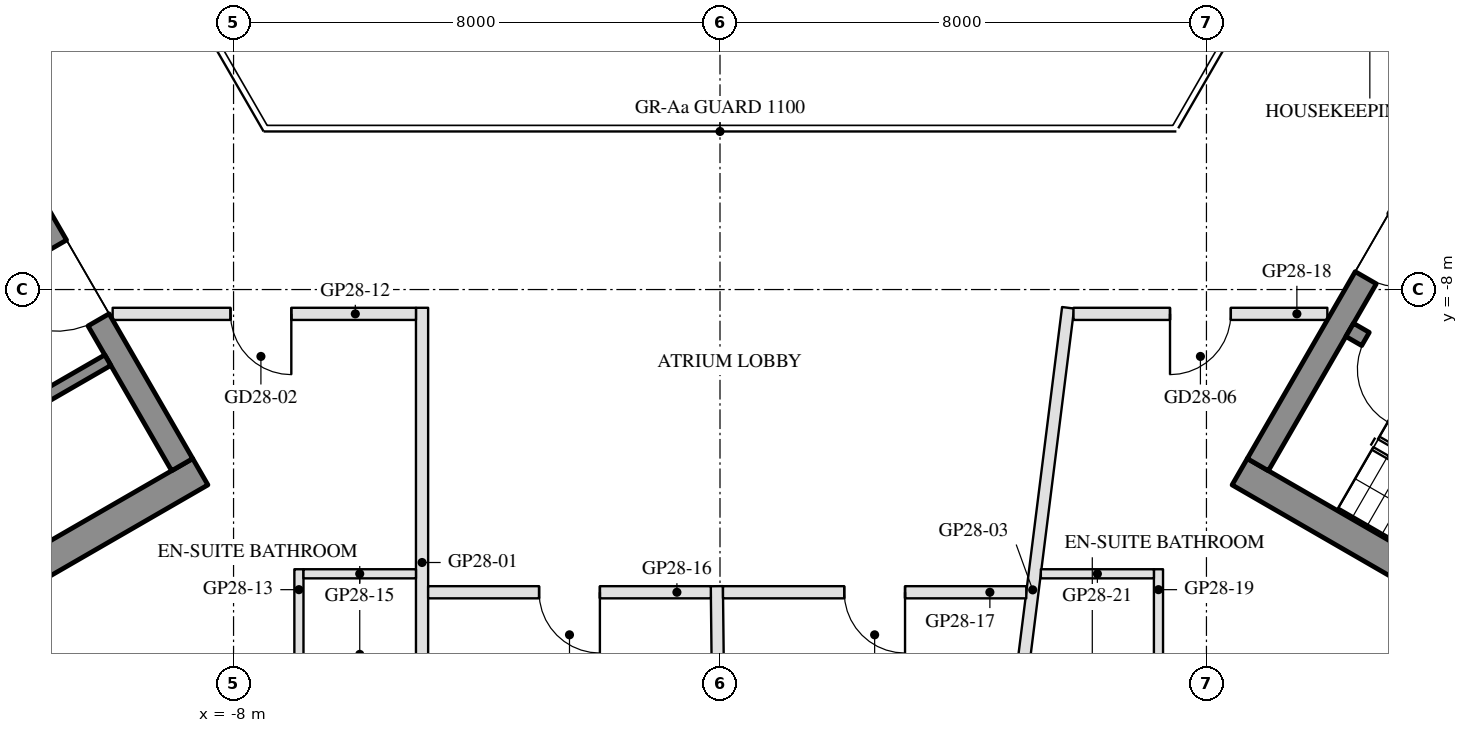
"""IFC4 building model, lengths in metres.
Left out: names, types, materials, properties, quantities, classifications, styles, units other than length and angle.
Written with IfcOpenShell. Run it as: python <this file> out.ifc"""

import sys

from ifc_helpers import new_model, si_unit, direction, frame, frame_2d, origin, place, context, subcontext, project, spatial, rectangle, extrude, element, fill, save


model = new_model("IFC4")
c1 = context("Model", 3, precision=1e-05, world=origin(), true_north=direction((0.0, 1.0)))
c2 = subcontext(c1, "Body", "Model", "MODEL_VIEW")
j1 = project(units=[si_unit("LENGTHUNIT", "METRE"), si_unit("PLANEANGLEUNIT", "RADIAN")], contexts=[c1])
p1 = place(None, origin())
s1 = spatial("IfcSite", under=j1, at=p1, CompositionType="ELEMENT")
p2 = place(p1, origin())
s2 = spatial("IfcBuilding", under=s1, at=p2, CompositionType="ELEMENT")
p3 = place(p2, frame((0.0, 0.0, 283.7)))
s3 = spatial("IfcBuildingStorey", under=s2, at=p3, CompositionType="ELEMENT", Elevation=283.7)
p4 = place(p3, frame((-8.547, -10.997, 0.0), z_axis=(0.0, 0.0, 1.0), x_axis=(-0.866024688907, -0.500001238203, 0.0)))
e1 = element("IfcWall", 1, at=p4, inside=s3, PredefinedType="SHEAR", context=c2, shape_type="SweptSolid", body=[
    extrude(rectangle(XDim=12.129, YDim=0.5, at=frame_2d((6.064, 0.0))), origin(), (0.0, 0.0, 1.0), 3.5),
])
p5 = place(p3, frame((-13.845, -2.22, 0.0), z_axis=(0.0, 0.0, 1.0), x_axis=(0.500004234368, -0.866022959057, 0.0)))
e2 = element("IfcWall", 2, at=p5, inside=s3, PredefinedType="SHEAR", context=c2, shape_type="SweptSolid", body=[
    extrude(rectangle(XDim=10.0, YDim=0.4, at=frame_2d((5.0, 0.0))), origin(), (0.0, 0.0, 1.0), 3.5),
])
p6 = place(p5, frame((3.55, 0.0, 0.0)))
e3 = element("IfcOpeningElement", 3, at=p6, cuts=e2, PredefinedType="OPENING", context=c2, shape_type="SweptSolid", body=[
    extrude(rectangle(XDim=1.1, YDim=2.1, at=frame_2d((0.55, 1.05))), frame((0.0, 0.21, 0.0), z_axis=(0.0, -1.0, 0.0), x_axis=(1.0, 0.0, 0.0)), (0.0, 0.0, 1.0), 0.42),
])
p7 = place(p5, frame((5.85, 0.0, 0.0)))
e4 = element("IfcOpeningElement", 4, at=p7, cuts=e2, PredefinedType="OPENING", context=c2, shape_type="SweptSolid", body=[
    extrude(rectangle(XDim=1.4, YDim=2.1, at=frame_2d((0.7, 1.05))), frame((0.0, 0.21, 0.0), z_axis=(0.0, -1.0, 0.0), x_axis=(1.0, 0.0, 0.0)), (0.0, 0.0, 1.0), 0.42),
])
p8 = place(p3, frame((-10.068, -9.162, 0.0), z_axis=(0.0, 0.0, 1.0), x_axis=(-0.866032725843, -0.499987317609, 0.0)))
e5 = element("IfcWall", 5, at=p8, inside=s3, PredefinedType="SHEAR", context=c2, shape_type="SweptSolid", body=[
    extrude(rectangle(XDim=10.16, YDim=0.2, at=frame_2d((5.08, 0.0))), origin(), (0.0, 0.0, 1.0), 3.5),
])
p9 = place(p8, frame((1.99, 0.0, 0.0)))
e6 = element("IfcOpeningElement", 6, at=p9, cuts=e5, PredefinedType="OPENING", context=c2, shape_type="SweptSolid", body=[
    extrude(rectangle(XDim=0.9, YDim=2.1, at=frame_2d((0.45, 1.05))), frame((0.0, 0.11, 0.0), z_axis=(0.0, -1.0, 0.0), x_axis=(1.0, 0.0, 0.0)), (0.0, 0.0, 1.0), 0.22),
])
p10 = place(p8, frame((7.07, 0.0, 0.0)))
e7 = element("IfcOpeningElement", 7, at=p10, cuts=e5, PredefinedType="OPENING", context=c2, shape_type="SweptSolid", body=[
    extrude(rectangle(XDim=0.9, YDim=2.1, at=frame_2d((0.45, 1.05))), frame((0.0, 0.11, 0.0), z_axis=(0.0, -1.0, 0.0), x_axis=(1.0, 0.0, 0.0)), (0.0, 0.0, 1.0), 0.22),
])
p11 = place(p3, frame((8.547, -10.997, 0.0), z_axis=(0.0, 0.0, 1.0), x_axis=(0.866024688907, -0.500001238203, 0.0)))
e8 = element("IfcWall", 8, at=p11, inside=s3, PredefinedType="SHEAR", context=c2, shape_type="SweptSolid", body=[
    extrude(rectangle(XDim=12.129, YDim=0.5, at=frame_2d((6.064, 0.0))), origin(), (0.0, 0.0, 1.0), 3.5),
])
p12 = place(p3, frame((8.845, -10.88, 0.0), z_axis=(0.0, 0.0, 1.0), x_axis=(0.500004234368, 0.866022959057, 0.0)))
e9 = element("IfcWall", 9, at=p12, inside=s3, PredefinedType="SHEAR", context=c2, shape_type="SweptSolid", body=[
    extrude(rectangle(XDim=10.0, YDim=0.4, at=frame_2d((5.0, 0.0))), origin(), (0.0, 0.0, 1.0), 3.5),
])
p13 = place(p12, frame((3.55, 0.0, 0.0)))
e10 = element("IfcOpeningElement", 10, at=p13, cuts=e9, PredefinedType="OPENING", context=c2, shape_type="SweptSolid", body=[
    extrude(rectangle(XDim=1.1, YDim=2.1, at=frame_2d((0.55, 1.05))), frame((0.0, 0.21, 0.0), z_axis=(0.0, -1.0, 0.0), x_axis=(1.0, 0.0, 0.0)), (0.0, 0.0, 1.0), 0.42),
])
p14 = place(p12, frame((5.85, 0.0, 0.0)))
e11 = element("IfcOpeningElement", 11, at=p14, cuts=e9, PredefinedType="OPENING", context=c2, shape_type="SweptSolid", body=[
    extrude(rectangle(XDim=1.4, YDim=2.1, at=frame_2d((0.7, 1.05))), frame((0.0, 0.21, 0.0), z_axis=(0.0, -1.0, 0.0), x_axis=(1.0, 0.0, 0.0)), (0.0, 0.0, 1.0), 0.42),
])
p15 = place(p3, frame((10.356, -8.664, 0.0), z_axis=(0.0, 0.0, 1.0), x_axis=(0.866028629588, -0.499994412703, 0.0)))
e12 = element("IfcWall", 12, at=p15, inside=s3, PredefinedType="SHEAR", context=c2, shape_type="SweptSolid", body=[
    extrude(rectangle(XDim=6.45, YDim=0.25, at=frame_2d((3.225, 0.0))), origin(), (0.0, 0.0, 1.0), 3.5),
])
p16 = place(p15, frame((0.3, 0.0, 0.0)))
e13 = element("IfcOpeningElement", 13, at=p16, cuts=e12, PredefinedType="OPENING", context=c2, shape_type="SweptSolid", body=[
    extrude(rectangle(XDim=1.0, YDim=2.1, at=frame_2d((0.5, 1.05))), frame((0.0, 0.135, 0.0), z_axis=(0.0, -1.0, 0.0), x_axis=(1.0, 0.0, 0.0)), (0.0, 0.0, 1.0), 0.27),
])
p17 = place(p3, frame((-4.9, -16.679, 0.0), z_axis=(0.0, 0.0, 1.0), x_axis=(0.0, 1.0, 0.0)))
e14 = element("IfcWall", 14, at=p17, inside=s3, PredefinedType="PARTITIONING", context=c2, shape_type="SweptSolid", body=[
    extrude(rectangle(XDim=8.379, YDim=0.2, at=frame_2d((4.189, 0.0))), origin(), (0.0, 0.0, 1.0), 3.1),
])
p18 = place(p3, frame((-0.015, -16.204, 0.0), z_axis=(0.0, 0.0, 1.0), x_axis=(-0.011013356537, 0.99993935115, 0.0)))
e15 = element("IfcWall", 15, at=p18, inside=s3, PredefinedType="PARTITIONING", context=c2, shape_type="SweptSolid", body=[
    extrude(rectangle(XDim=3.325, YDim=0.2, at=frame_2d((1.663, 0.0))), origin(), (0.0, 0.0, 1.0), 3.05),
])
p19 = place(p3, frame((4.56, -17.579, 0.0), z_axis=(0.0, 0.0, 1.0), x_axis=(0.124584174438, 0.992209042228, 0.0)))
e16 = element("IfcWall", 16, at=p19, inside=s3, PredefinedType="PARTITIONING", context=c2, shape_type="SweptSolid", body=[
    extrude(rectangle(XDim=9.351, YDim=0.2, at=frame_2d((4.676, 0.0))), origin(), (0.0, 0.0, 1.0), 3.1),
])
p20 = place(p3, frame((-5.0, -8.4, 0.0), z_axis=(0.0, 0.0, 1.0), x_axis=(-1.0, 0.0, 0.0)))
e17 = element("IfcWall", 17, at=p20, inside=s3, PredefinedType="PARTITIONING", context=c2, shape_type="SweptSolid", body=[
    extrude(rectangle(XDim=4.988, YDim=0.2, at=frame_2d((2.494, 0.0))), origin(), (0.0, 0.0, 1.0), 3.05),
])
p21 = place(p20, frame((2.05, 0.0, 0.0)))
e18 = element("IfcOpeningElement", 18, at=p21, cuts=e17, PredefinedType="OPENING", context=c2, shape_type="SweptSolid", body=[
    extrude(rectangle(XDim=1.0, YDim=2.1, at=frame_2d((0.5, 1.05))), frame((0.0, 0.11, 0.0), z_axis=(0.0, -1.0, 0.0), x_axis=(1.0, 0.0, 0.0)), (0.0, 0.0, 1.0), 0.22),
])
p22 = place(p3, frame((-6.925, -12.6, 0.0), z_axis=(0.0, 0.0, 1.0), x_axis=(0.0, -1.0, 0.0)))
e19 = element("IfcWall", 19, at=p22, inside=s3, PredefinedType="PARTITIONING", context=c2, shape_type="SweptSolid", body=[
    extrude(rectangle(XDim=2.8, YDim=0.15, at=frame_2d((1.4, 0.0))), origin(), (0.0, 0.0, 1.0), 3.55),
])
p23 = place(p22, frame((1.4, 0.0, 0.0)))
e20 = element("IfcOpeningElement", 20, at=p23, cuts=e19, PredefinedType="OPENING", context=c2, shape_type="SweptSolid", body=[
    extrude(rectangle(XDim=0.9, YDim=2.1, at=frame_2d((0.45, 1.05))), frame((0.0, 0.085, 0.0), z_axis=(0.0, -1.0, 0.0), x_axis=(1.0, 0.0, 0.0)), (0.0, 0.0, 1.0), 0.17),
])
p24 = place(p3, frame((-6.85, -12.675, 0.0), z_axis=(0.0, 0.0, 1.0), x_axis=(1.0, 0.0, 0.0)))
e21 = element("IfcWall", 21, at=p24, inside=s3, PredefinedType="PARTITIONING", context=c2, shape_type="SweptSolid", body=[
    extrude(rectangle(XDim=1.85, YDim=0.15, at=frame_2d((0.925, 0.0))), origin(), (0.0, 0.0, 1.0), 3.55),
])
p25 = place(p3, frame((-0.151, -12.979, 0.0), z_axis=(0.0, 0.0, 1.0), x_axis=(-1.0, 0.0, 0.0)))
e22 = element("IfcWall", 22, at=p25, inside=s3, PredefinedType="PARTITIONING", context=c2, shape_type="SweptSolid", body=[
    extrude(rectangle(XDim=4.649, YDim=0.2, at=frame_2d((2.325, 0.0))), origin(), (0.0, 0.0, 1.0), 3.05),
])
p26 = place(p25, frame((1.825, 0.0, 0.0)))
e23 = element("IfcOpeningElement", 23, at=p26, cuts=e22, PredefinedType="OPENING", context=c2, shape_type="SweptSolid", body=[
    extrude(rectangle(XDim=1.0, YDim=2.1, at=frame_2d((0.5, 1.05))), frame((0.0, 0.11, 0.0), z_axis=(0.0, -1.0, 0.0), x_axis=(1.0, 0.0, 0.0)), (0.0, 0.0, 1.0), 0.22),
])
p27 = place(p3, frame((5.037, -12.979, 0.0), z_axis=(0.0, 0.0, 1.0), x_axis=(-1.0, 0.0, 0.0)))
e24 = element("IfcWall", 24, at=p27, inside=s3, PredefinedType="PARTITIONING", context=c2, shape_type="SweptSolid", body=[
    extrude(rectangle(XDim=4.988, YDim=0.2, at=frame_2d((2.494, 0.0))), origin(), (0.0, 0.0, 1.0), 3.05),
])
p28 = place(p27, frame((1.994, 0.0, 0.0)))
e25 = element("IfcOpeningElement", 25, at=p28, cuts=e24, PredefinedType="OPENING", context=c2, shape_type="SweptSolid", body=[
    extrude(rectangle(XDim=1.0, YDim=2.1, at=frame_2d((0.5, 1.05))), frame((0.0, 0.11, 0.0), z_axis=(0.0, -1.0, 0.0), x_axis=(1.0, 0.0, 0.0)), (0.0, 0.0, 1.0), 0.22),
])
p29 = place(p3, frame((9.988, -8.4, 0.0), z_axis=(0.0, 0.0, 1.0), x_axis=(-1.0, 0.0, 0.0)))
e26 = element("IfcWall", 26, at=p29, inside=s3, PredefinedType="PARTITIONING", context=c2, shape_type="SweptSolid", body=[
    extrude(rectangle(XDim=4.175, YDim=0.2, at=frame_2d((2.087, 0.0))), origin(), (0.0, 0.0, 1.0), 3.05),
])
p30 = place(p29, frame((1.587, 0.0, 0.0)))
e27 = element("IfcOpeningElement", 27, at=p30, cuts=e26, PredefinedType="OPENING", context=c2, shape_type="SweptSolid", body=[
    extrude(rectangle(XDim=1.0, YDim=2.1, at=frame_2d((0.5, 1.05))), frame((0.0, 0.11, 0.0), z_axis=(0.0, -1.0, 0.0), x_axis=(1.0, 0.0, 0.0)), (0.0, 0.0, 1.0), 0.22),
])
p31 = place(p3, frame((7.211, -15.4, 0.0), z_axis=(0.0, 0.0, 1.0), x_axis=(0.0, 1.0, 0.0)))
e28 = element("IfcWall", 28, at=p31, inside=s3, PredefinedType="PARTITIONING", context=c2, shape_type="SweptSolid", body=[
    extrude(rectangle(XDim=2.8, YDim=0.15, at=frame_2d((1.4, 0.0))), origin(), (0.0, 0.0, 1.0), 3.05),
])
p32 = place(p31, frame((0.5, 0.0, 0.0)))
e29 = element("IfcOpeningElement", 29, at=p32, cuts=e28, PredefinedType="OPENING", context=c2, shape_type="SweptSolid", body=[
    extrude(rectangle(XDim=0.9, YDim=2.1, at=frame_2d((0.45, 1.05))), frame((0.0, 0.085, 0.0), z_axis=(0.0, -1.0, 0.0), x_axis=(1.0, 0.0, 0.0)), (0.0, 0.0, 1.0), 0.17),
])
p33 = place(p3, frame((5.277, -12.675, 0.0), z_axis=(0.0, 0.0, 1.0), x_axis=(1.0, 0.0, 0.0)))
e30 = element("IfcWall", 30, at=p33, inside=s3, PredefinedType="PARTITIONING", context=c2, shape_type="SweptSolid", body=[
    extrude(rectangle(XDim=1.859, YDim=0.15, at=frame_2d((0.93, 0.0))), origin(), (0.0, 0.0, 1.0), 3.05),
])
p34 = place(p3, frame((10.382, -1.182, 0.0), z_axis=(0.0, 0.0, 1.0), x_axis=(0.50002859319, -0.866008894869, 0.0)))
e31 = element("IfcWall", 31, at=p34, inside=s3, PredefinedType="PARTITIONING", context=c2, shape_type="SweptSolid", body=[
    extrude(rectangle(XDim=3.774, YDim=0.2, at=frame_2d((1.887, 0.0))), origin(), (0.0, 0.0, 1.0), 3.05),
])
p35 = place(p34, frame((1.387, 0.0, 0.0)))
e32 = element("IfcOpeningElement", 32, at=p35, cuts=e31, PredefinedType="OPENING", context=c2, shape_type="SweptSolid", body=[
    extrude(rectangle(XDim=1.0, YDim=2.1, at=frame_2d((0.5, 1.05))), frame((0.0, 0.11, 0.0), z_axis=(0.0, -1.0, 0.0), x_axis=(1.0, 0.0, 0.0)), (0.0, 0.0, 1.0), 0.22),
])
p36 = place(p3, frame((-12.269, -4.45, 0.0), z_axis=(0.0, 0.0, 1.0), x_axis=(0.500000040646, 0.866025380318, 0.0)))
e33 = element("IfcWall", 33, at=p36, inside=s3, PredefinedType="PARTITIONING", context=c2, shape_type="SweptSolid", body=[
    extrude(rectangle(XDim=3.781, YDim=0.2, at=frame_2d((1.891, 0.0))), origin(), (0.0, 0.0, 1.0), 3.05),
])
p37 = place(p36, frame((1.391, 0.0, 0.0)))
e34 = element("IfcOpeningElement", 34, at=p37, cuts=e33, PredefinedType="OPENING", context=c2, shape_type="SweptSolid", body=[
    extrude(rectangle(XDim=1.0, YDim=2.1, at=frame_2d((0.5, 1.05))), frame((0.0, 0.11, 0.0), z_axis=(0.0, -1.0, 0.0), x_axis=(1.0, 0.0, 0.0)), (0.0, 0.0, 1.0), 0.22),
])
p38 = place(p7, frame((1.4, 0.0, 0.0), z_axis=(0.0, 0.0, 1.0), x_axis=(-1.0, 0.0, 0.0)))
e35 = element("IfcDoor", 35, at=p38, inside=s3, OperationType="DOUBLE_DOOR_SINGLE_SWING", PredefinedType="DOOR", context=c2, shape_type="SweptSolid", body=[
    extrude(rectangle(XDim=1.4, YDim=2.1, at=frame_2d((0.7, 1.05))), frame((0.0, 0.025, 0.0), z_axis=(0.0, -1.0, 0.0), x_axis=(1.0, 0.0, 0.0)), (0.0, 0.0, 1.0), 0.05),
])
fill(e4, e35)
p39 = place(p13, frame((1.1, 0.0, 0.0), z_axis=(0.0, 0.0, 1.0), x_axis=(-1.0, 0.0, 0.0)))
e36 = element("IfcDoor", 36, at=p39, inside=s3, OperationType="SINGLE_SWING_LEFT", PredefinedType="DOOR", context=c2, shape_type="SweptSolid", body=[
    extrude(rectangle(XDim=1.1, YDim=2.1, at=frame_2d((0.55, 1.05))), frame((0.0, 0.025, 0.0), z_axis=(0.0, -1.0, 0.0), x_axis=(1.0, 0.0, 0.0)), (0.0, 0.0, 1.0), 0.05),
])
fill(e10, e36)
p40 = place(p16, frame((1.0, 0.0, 0.0), z_axis=(0.0, 0.0, 1.0), x_axis=(-1.0, 0.0, 0.0)))
e37 = element("IfcDoor", 37, at=p40, inside=s3, OperationType="SINGLE_SWING_LEFT", PredefinedType="DOOR", context=c2, shape_type="SweptSolid", body=[
    extrude(rectangle(XDim=1.0, YDim=2.1, at=frame_2d((0.5, 1.05))), frame((0.0, 0.025, 0.0), z_axis=(0.0, -1.0, 0.0), x_axis=(1.0, 0.0, 0.0)), (0.0, 0.0, 1.0), 0.05),
])
fill(e13, e37)
p41 = place(p21, origin())
e38 = element("IfcDoor", 38, at=p41, inside=s3, OperationType="SINGLE_SWING_LEFT", PredefinedType="DOOR", context=c2, shape_type="SweptSolid", body=[
    extrude(rectangle(XDim=1.0, YDim=2.1, at=frame_2d((0.5, 1.05))), frame((0.0, 0.025, 0.0), z_axis=(0.0, -1.0, 0.0), x_axis=(1.0, 0.0, 0.0)), (0.0, 0.0, 1.0), 0.05),
])
fill(e18, e38)
p42 = place(p26, origin())
e39 = element("IfcDoor", 39, at=p42, inside=s3, OperationType="SINGLE_SWING_LEFT", PredefinedType="DOOR", context=c2, shape_type="SweptSolid", body=[
    extrude(rectangle(XDim=1.0, YDim=2.1, at=frame_2d((0.5, 1.05))), frame((0.0, 0.025, 0.0), z_axis=(0.0, -1.0, 0.0), x_axis=(1.0, 0.0, 0.0)), (0.0, 0.0, 1.0), 0.05),
])
fill(e23, e39)
p43 = place(p28, origin())
e40 = element("IfcDoor", 40, at=p43, inside=s3, OperationType="SINGLE_SWING_LEFT", PredefinedType="DOOR", context=c2, shape_type="SweptSolid", body=[
    extrude(rectangle(XDim=1.0, YDim=2.1, at=frame_2d((0.5, 1.05))), frame((0.0, 0.025, 0.0), z_axis=(0.0, -1.0, 0.0), x_axis=(1.0, 0.0, 0.0)), (0.0, 0.0, 1.0), 0.05),
])
fill(e25, e40)
p44 = place(p30, origin())
e41 = element("IfcDoor", 41, at=p44, inside=s3, OperationType="SINGLE_SWING_RIGHT", PredefinedType="DOOR", context=c2, shape_type="SweptSolid", body=[
    extrude(rectangle(XDim=1.0, YDim=2.1, at=frame_2d((0.5, 1.05))), frame((0.0, 0.025, 0.0), z_axis=(0.0, -1.0, 0.0), x_axis=(1.0, 0.0, 0.0)), (0.0, 0.0, 1.0), 0.05),
])
fill(e27, e41)
save(model, sys.argv[1])
